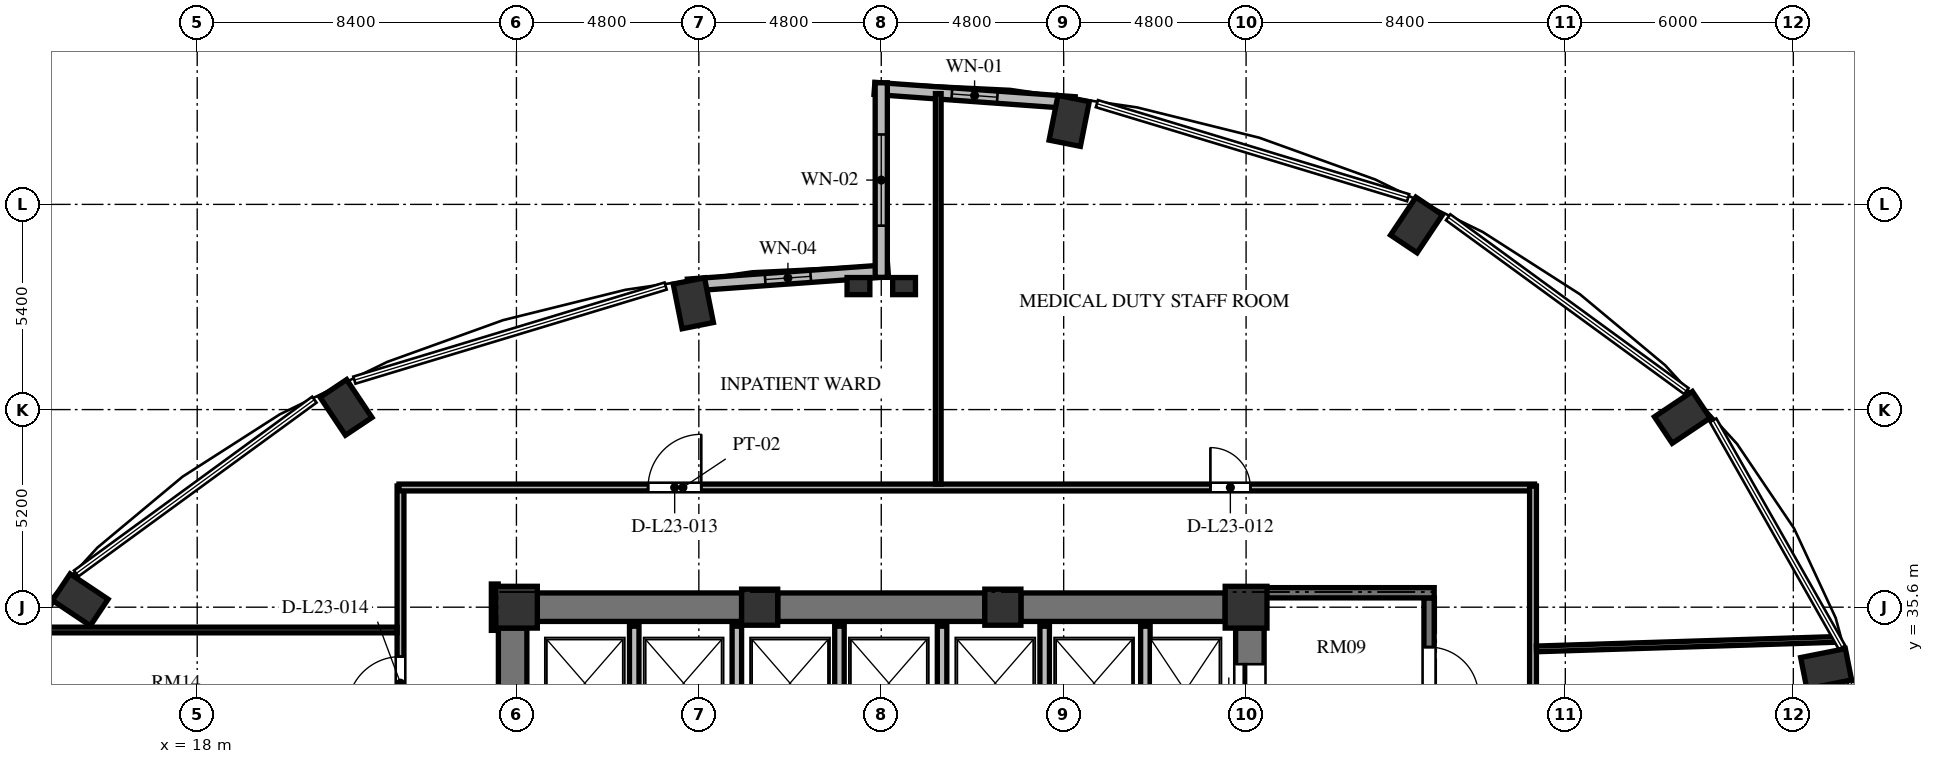
"""IFC4 building model, lengths in metres.
Left out: names, types, materials, properties, quantities, classifications, styles, units other than length and angle.
Written with IfcOpenShell. Run it as: python <this file> out.ifc"""

import sys

from ifc_helpers import new_model, si_unit, direction, frame, frame_2d, origin, origin_2d, place, context, subcontext, project, spatial, rectangle, extrude, element, fill, save


model = new_model("IFC4")
c1 = context("Model", 3, precision=1e-05, world=origin(), true_north=direction((0.0, 1.0)))
c2 = subcontext(c1, "Body", "Model", "MODEL_VIEW")
j1 = project(units=[si_unit("LENGTHUNIT", "METRE"), si_unit("PLANEANGLEUNIT", "RADIAN")], contexts=[c1])
p1 = place(None, origin())
s1 = spatial("IfcSite", under=j1, at=p1, CompositionType="ELEMENT")
p2 = place(p1, origin())
s2 = spatial("IfcBuilding", under=s1, at=p2, CompositionType="ELEMENT")
p3 = place(p2, frame((0.0, 0.0, 92.688)))
s3 = spatial("IfcBuildingStorey", under=s2, at=p3, CompositionType="ELEMENT", Elevation=92.688)
for number, where, z_axis, x_axis in (
    (1, (60.863, 33.98, 0.0), (0.0, 0.0, 1.0), (0.981, 0.195, 0.0)),
    (2, (57.078, 40.595, 0.0), (0.0, 0.0, 1.0), (0.831, 0.556, 0.0)),
    (3, (50.084, 45.657, 0.0), (0.0, 0.0, 1.0), (0.556, 0.831, 0.0)),
    (4, (40.946, 48.397, 0.0), (0.0, 0.0, 1.0), (0.195, 0.981, 0.0)),
    (5, (31.054, 43.597, 0.0), (0.0, 0.0, 1.0), (-0.195, 0.981, 0.0)),
    (6, (21.916, 40.857, 0.0), (0.0, 0.0, 1.0), (-0.556, 0.831, 0.0)),
    (7, (14.922, 35.795, 0.0), (0.0, 0.0, 1.0), (-0.831, 0.556, 0.0)),
):
    element("IfcColumn", number, at=place(p3, frame(where, z_axis=z_axis, x_axis=x_axis)), inside=s3, PredefinedType="COLUMN", context=c2, shape_type="SweptSolid", body=[
        extrude(rectangle(XDim=1.2, YDim=0.84, at=origin_2d()), origin(), (0.0, 0.0, 1.0), 3.648),
    ])
p4 = place(p3, frame((45.6, 35.6, 0.0), z_axis=(0.0, 0.0, 1.0), x_axis=(1.0, 0.0, 0.0)))
e8 = element("IfcColumn", 8, at=p4, inside=s3, PredefinedType="COLUMN", context=c2, shape_type="SweptSolid", body=[
    extrude(rectangle(XDim=1.1, YDim=1.1, at=origin_2d()), origin(), (0.0, 0.0, 1.0), 3.648),
])
for number, where, z_axis, x_axis in (
    (9, (39.2, 35.6, 0.0), (0.0, 0.0, 1.0), (1.0, 0.0, 0.0)),
    (10, (32.8, 35.6, 0.0), (0.0, 0.0, 1.0), (1.0, 0.0, 0.0)),
):
    element("IfcColumn", number, at=place(p3, frame(where, z_axis=z_axis, x_axis=x_axis)), inside=s3, PredefinedType="COLUMN", context=c2, shape_type="SweptSolid", body=[
        extrude(rectangle(XDim=0.95, YDim=0.95, at=origin_2d()), origin(), (0.0, 0.0, 1.0), 3.648),
    ])
p5 = place(p3, frame((26.4, 35.6, 0.0), z_axis=(0.0, 0.0, 1.0), x_axis=(1.0, 0.0, 0.0)))
e11 = element("IfcColumn", 11, at=p5, inside=s3, PredefinedType="COLUMN", context=c2, shape_type="SweptSolid", body=[
    extrude(rectangle(XDim=1.1, YDim=1.1, at=origin_2d()), origin(), (0.0, 0.0, 1.0), 3.648),
])
for number, where, z_axis, x_axis in (
    (12, (35.4, 44.05, 0.0), (0.0, 0.0, 1.0), (1.0, 0.0, 0.0)),
    (13, (36.6, 44.05, 0.0), (0.0, 0.0, 1.0), (1.0, 0.0, 0.0)),
):
    element("IfcColumn", number, at=place(p3, frame(where, z_axis=z_axis, x_axis=x_axis)), inside=s3, PredefinedType="PILASTER", context=c2, shape_type="SweptSolid", body=[
        extrude(rectangle(XDim=0.6, YDim=0.45, at=origin_2d()), origin(), (0.0, 0.0, 1.0), 3.648),
    ])
p6 = place(p3, frame((26.3, 20.95, 0.0), z_axis=(0.0, 0.0, 1.0), x_axis=(0.0, 1.0, 0.0)))
e14 = element("IfcWall", 14, at=p6, inside=s3, PredefinedType="SHEAR", context=c2, shape_type="SweptSolid", body=[
    extrude(rectangle(XDim=14.1, YDim=0.75, at=frame_2d((7.05, 0.0))), origin(), (0.0, 0.0, 1.0), 3.648),
])
p7 = place(p6, frame((6.5, 0.0, 0.0)))
e15 = element("IfcOpeningElement", 15, at=p7, cuts=e14, PredefinedType="OPENING", context=c2, shape_type="SweptSolid", body=[
    extrude(rectangle(XDim=1.2, YDim=2.15, at=frame_2d((0.6, 1.075))), frame((0.0, 0.385, 0.0), z_axis=(0.0, -1.0, 0.0), x_axis=(1.0, 0.0, 0.0)), (0.0, 0.0, 1.0), 0.77),
])
p8 = place(p6, frame((9.6, 0.0, 0.0)))
e16 = element("IfcOpeningElement", 16, at=p8, cuts=e14, PredefinedType="OPENING", context=c2, shape_type="SweptSolid", body=[
    extrude(rectangle(XDim=1.3, YDim=2.2, at=frame_2d((0.65, 1.1))), frame((0.0, 0.385, 0.0), z_axis=(0.0, -1.0, 0.0), x_axis=(1.0, 0.0, 0.0)), (0.0, 0.0, 1.0), 0.77),
])
p9 = place(p6, frame((3.26, 0.0, 0.0)))
e17 = element("IfcOpeningElement", 17, at=p9, cuts=e14, PredefinedType="OPENING", context=c2, shape_type="SweptSolid", body=[
    extrude(rectangle(XDim=1.3, YDim=2.2, at=frame_2d((0.65, 1.1))), frame((0.0, 0.385, 0.0), z_axis=(0.0, -1.0, 0.0), x_axis=(1.0, 0.0, 0.0)), (0.0, 0.0, 1.0), 0.77),
])
p10 = place(p3, frame((45.7, 20.95, 0.0), z_axis=(0.0, 0.0, 1.0), x_axis=(0.0, 1.0, 0.0)))
e18 = element("IfcWall", 18, at=p10, inside=s3, PredefinedType="SHEAR", context=c2, shape_type="SweptSolid", body=[
    extrude(rectangle(XDim=14.1, YDim=0.75, at=frame_2d((7.05, 0.0))), origin(), (0.0, 0.0, 1.0), 3.648),
])
p11 = place(p10, frame((11.75, 0.0, 0.0)))
e19 = element("IfcOpeningElement", 19, at=p11, cuts=e18, PredefinedType="OPENING", context=c2, shape_type="SweptSolid", body=[
    extrude(rectangle(XDim=1.4, YDim=2.3, at=frame_2d((0.7, 1.15))), frame((0.0, 0.385, 0.0), z_axis=(0.0, -1.0, 0.0), x_axis=(1.0, 0.0, 0.0)), (0.0, 0.0, 1.0), 0.77),
])
p12 = place(p10, frame((0.95, 0.0, 0.0)))
e20 = element("IfcOpeningElement", 20, at=p12, cuts=e18, PredefinedType="OPENING", context=c2, shape_type="SweptSolid", body=[
    extrude(rectangle(XDim=1.4, YDim=2.3, at=frame_2d((0.7, 1.15))), frame((0.0, 0.385, 0.0), z_axis=(0.0, -1.0, 0.0), x_axis=(1.0, 0.0, 0.0)), (0.0, 0.0, 1.0), 0.77),
])
p13 = place(p3, frame((26.95, 35.6, 0.0), z_axis=(0.0, 0.0, 1.0), x_axis=(1.0, 0.0, 0.0)))
e21 = element("IfcWall", 21, at=p13, inside=s3, PredefinedType="SHEAR", context=c2, shape_type="SweptSolid", body=[
    extrude(rectangle(XDim=5.375, YDim=0.75, at=frame_2d((2.688, 0.0))), origin(), (0.0, 0.0, 1.0), 3.648),
])
p14 = place(p3, frame((33.275, 35.6, 0.0), z_axis=(0.0, 0.0, 1.0), x_axis=(1.0, 0.0, 0.0)))
e22 = element("IfcWall", 22, at=p14, inside=s3, PredefinedType="SHEAR", context=c2, shape_type="SweptSolid", body=[
    extrude(rectangle(XDim=5.45, YDim=0.75, at=frame_2d((2.725, 0.0))), origin(), (0.0, 0.0, 1.0), 3.648),
])
p15 = place(p3, frame((39.675, 35.6, 0.0), z_axis=(0.0, 0.0, 1.0), x_axis=(1.0, 0.0, 0.0)))
e23 = element("IfcWall", 23, at=p15, inside=s3, PredefinedType="SHEAR", context=c2, shape_type="SweptSolid", body=[
    extrude(rectangle(XDim=5.375, YDim=0.75, at=frame_2d((2.688, 0.0))), origin(), (0.0, 0.0, 1.0), 3.648),
])
p16 = place(p3, frame((41.091, 48.875, 0.0), z_axis=(0.0, 0.0, 1.0), x_axis=(-0.997432364291, 0.071614793619, 0.0)))
e24 = element("IfcWall", 24, at=p16, inside=s3, PredefinedType="SOLIDWALL", context=c2, shape_type="SweptSolid", body=[
    extrude(rectangle(XDim=5.284, YDim=0.32, at=frame_2d((2.642, 0.0))), origin(), (0.0, 0.0, 1.0), 3.428),
])
p17 = place(p16, frame((2.042, 0.0, 0.85)))
e25 = element("IfcOpeningElement", 25, at=p17, cuts=e24, PredefinedType="OPENING", context=c2, shape_type="SweptSolid", body=[
    extrude(rectangle(XDim=1.2, YDim=2.2, at=frame_2d((0.6, 1.1))), frame((0.0, 0.17, 0.0), z_axis=(0.0, -1.0, 0.0), x_axis=(1.0, 0.0, 0.0)), (0.0, 0.0, 1.0), 0.34),
])
p18 = place(p3, frame((36.179, 44.453, 0.0), z_axis=(0.0, 0.0, 1.0), x_axis=(-0.997431890304, -0.071621394884, 0.0)))
e26 = element("IfcWall", 26, at=p18, inside=s3, PredefinedType="SOLIDWALL", context=c2, shape_type="SweptSolid", body=[
    extrude(rectangle(XDim=5.284, YDim=0.32, at=frame_2d((2.642, 0.0))), origin(), (0.0, 0.0, 1.0), 3.428),
])
p19 = place(p18, frame((2.042, 0.0, 0.85)))
e27 = element("IfcOpeningElement", 27, at=p19, cuts=e26, PredefinedType="OPENING", context=c2, shape_type="SweptSolid", body=[
    extrude(rectangle(XDim=1.2, YDim=1.8, at=frame_2d((0.6, 0.9))), frame((0.0, 0.17, 0.0), z_axis=(0.0, -1.0, 0.0), x_axis=(1.0, 0.0, 0.0)), (0.0, 0.0, 1.0), 0.34),
])
p20 = place(p3, frame((36.0, 49.4, 0.0), z_axis=(0.0, 0.0, 1.0), x_axis=(0.0, -1.0, 0.0)))
e28 = element("IfcWall", 28, at=p20, inside=s3, PredefinedType="SOLIDWALL", context=c2, shape_type="SweptSolid", body=[
    extrude(rectangle(XDim=5.12, YDim=0.32, at=frame_2d((2.56, 0.0))), origin(), (0.0, 0.0, 1.0), 3.428),
])
p21 = place(p20, frame((1.36, 0.0, 0.84)))
e29 = element("IfcOpeningElement", 29, at=p21, cuts=e28, PredefinedType="OPENING", context=c2, shape_type="SweptSolid", body=[
    extrude(rectangle(XDim=2.4, YDim=2.04, at=frame_2d((1.2, 1.02))), frame((0.0, 0.17, 0.0), z_axis=(0.0, -1.0, 0.0), x_axis=(1.0, 0.0, 0.0)), (0.0, 0.0, 1.0), 0.34),
])
p22 = place(p3, frame((42.95, 31.92, 0.0), z_axis=(0.0, 0.0, 1.0), x_axis=(0.0, 1.0, 0.0)))
e30 = element("IfcWall", 30, at=p22, inside=s3, PredefinedType="SOLIDWALL", context=c2, shape_type="SweptSolid", body=[
    extrude(rectangle(XDim=3.18, YDim=0.25, at=frame_2d((1.59, 0.0))), origin(), (0.0, 0.0, 1.0), 3.428),
])
for number, where, z_axis, x_axis in (
    (31, (29.5, 32.42, 0.0), (0.0, 0.0, 1.0), (0.0, 1.0, 0.0)),
    (32, (32.2, 32.42, 0.0), (0.0, 0.0, 1.0), (0.0, 1.0, 0.0)),
    (33, (34.9, 32.42, 0.0), (0.0, 0.0, 1.0), (0.0, 1.0, 0.0)),
    (34, (37.6, 32.42, 0.0), (0.0, 0.0, 1.0), (0.0, 1.0, 0.0)),
    (35, (40.3, 32.42, 0.0), (0.0, 0.0, 1.0), (0.0, 1.0, 0.0)),
):
    element("IfcWall", number, at=place(p3, frame(where, z_axis=z_axis, x_axis=x_axis)), inside=s3, PredefinedType="SOLIDWALL", context=c2, shape_type="SweptSolid", body=[
        extrude(rectangle(XDim=2.68, YDim=0.25, at=frame_2d((1.34, 0.0))), origin(), (0.0, 0.0, 1.0), 3.428),
    ])
p23 = place(p3, frame((50.415, 35.845, 0.0), z_axis=(0.0, 0.0, 1.0), x_axis=(0.0, -1.0, 0.0)))
e36 = element("IfcWall", 36, at=p23, inside=s3, PredefinedType="SHEAR", context=c2, shape_type="SweptSolid", body=[
    extrude(rectangle(XDim=15.825, YDim=0.27, at=frame_2d((7.913, 0.0))), origin(), (0.0, 0.0, 1.0), 3.648),
])
p24 = place(p23, frame((4.445, 0.0, 0.0)))
e37 = element("IfcOpeningElement", 37, at=p24, cuts=e36, PredefinedType="OPENING", context=c2, shape_type="SweptSolid", body=[
    extrude(rectangle(XDim=1.2, YDim=2.15, at=frame_2d((0.6, 1.075))), frame((0.0, 0.145, 0.0), z_axis=(0.0, -1.0, 0.0), x_axis=(1.0, 0.0, 0.0)), (0.0, 0.0, 1.0), 0.29),
])
p25 = place(p23, frame((1.295, 0.0, 0.0)))
e38 = element("IfcOpeningElement", 38, at=p25, cuts=e36, PredefinedType="OPENING", context=c2, shape_type="SweptSolid", body=[
    extrude(rectangle(XDim=1.3, YDim=2.2, at=frame_2d((0.65, 1.1))), frame((0.0, 0.145, 0.0), z_axis=(0.0, -1.0, 0.0), x_axis=(1.0, 0.0, 0.0)), (0.0, 0.0, 1.0), 0.29),
])
p26 = place(p23, frame((13.095, 0.0, 0.0)))
e39 = element("IfcOpeningElement", 39, at=p26, cuts=e36, PredefinedType="OPENING", context=c2, shape_type="SweptSolid", body=[
    extrude(rectangle(XDim=1.3, YDim=2.2, at=frame_2d((0.65, 1.1))), frame((0.0, 0.145, 0.0), z_axis=(0.0, -1.0, 0.0), x_axis=(1.0, 0.0, 0.0)), (0.0, 0.0, 1.0), 0.29),
])
p27 = place(p3, frame((46.075, 35.98, 0.0), z_axis=(0.0, 0.0, 1.0), x_axis=(1.0, 0.0, 0.0)))
e40 = element("IfcWall", 40, at=p27, inside=s3, PredefinedType="SHEAR", context=c2, shape_type="SweptSolid", body=[
    extrude(rectangle(XDim=4.475, YDim=0.27, at=frame_2d((2.238, 0.0))), origin(), (0.0, 0.0, 1.0), 3.648),
])
p28 = place(p3, frame((23.35, 29.36, 0.0), z_axis=(0.0, 0.0, 1.0), x_axis=(0.0, 1.0, 0.0)))
e41 = element("IfcWall", 41, at=p28, inside=s3, PredefinedType="PARTITIONING", context=c2, shape_type="SweptSolid", body=[
    extrude(rectangle(XDim=9.43, YDim=0.18, at=frame_2d((4.715, 0.0))), origin(), (0.0, 0.0, 1.0), 3.428),
])
p29 = place(p28, frame((3.54, 0.0, 0.0)))
e42 = element("IfcOpeningElement", 42, at=p29, cuts=e41, PredefinedType="OPENING", context=c2, shape_type="SweptSolid", body=[
    extrude(rectangle(XDim=1.4, YDim=2.2, at=frame_2d((0.7, 1.1))), frame((0.0, 0.1, 0.0), z_axis=(0.0, -1.0, 0.0), x_axis=(1.0, 0.0, 0.0)), (0.0, 0.0, 1.0), 0.2),
])
p30 = place(p3, frame((23.31, 38.75, 0.0), z_axis=(0.0, 0.0, 1.0), x_axis=(1.0, 0.0, 0.0)))
e43 = element("IfcWall", 43, at=p30, inside=s3, PredefinedType="PARTITIONING", context=c2, shape_type="SweptSolid", body=[
    extrude(rectangle(XDim=29.88, YDim=0.18, at=frame_2d((14.94, 0.0))), origin(), (0.0, 0.0, 1.0), 3.053),
])
p31 = place(p30, frame((21.351, 0.0, 0.0)))
e44 = element("IfcOpeningElement", 44, at=p31, cuts=e43, PredefinedType="OPENING", context=c2, shape_type="SweptSolid", body=[
    extrude(rectangle(XDim=1.05, YDim=2.15, at=frame_2d((0.525, 1.075))), frame((0.0, 0.1, 0.0), z_axis=(0.0, -1.0, 0.0), x_axis=(1.0, 0.0, 0.0)), (0.0, 0.0, 1.0), 0.2),
])
p32 = place(p30, frame((6.554, 0.0, 0.0)))
e45 = element("IfcOpeningElement", 45, at=p32, cuts=e43, PredefinedType="OPENING", context=c2, shape_type="SweptSolid", body=[
    extrude(rectangle(XDim=1.4, YDim=2.2, at=frame_2d((0.7, 1.1))), frame((0.0, 0.1, 0.0), z_axis=(0.0, -1.0, 0.0), x_axis=(1.0, 0.0, 0.0)), (0.0, 0.0, 1.0), 0.2),
])
p33 = place(p3, frame((53.15, 38.79, 0.0), z_axis=(0.0, 0.0, 1.0), x_axis=(0.0, -1.0, 0.0)))
e46 = element("IfcWall", 46, at=p33, inside=s3, PredefinedType="PARTITIONING", context=c2, shape_type="SweptSolid", body=[
    extrude(rectangle(XDim=9.43, YDim=0.18, at=frame_2d((4.715, 0.0))), origin(), (0.0, 0.0, 1.0), 3.428),
])
p34 = place(p3, frame((25.83, 36.21, 0.0), z_axis=(0.0, 0.0, 1.0), x_axis=(0.0, -1.0, 0.0)))
e47 = element("IfcWall", 47, at=p34, inside=s3, PredefinedType="PARTITIONING", context=c2, shape_type="SweptSolid", body=[
    extrude(rectangle(XDim=1.22, YDim=0.18, at=frame_2d((0.61, 0.0))), origin(), (0.0, 0.0, 1.0), 3.428),
])
p35 = place(p3, frame((13.71, 35.0, 0.0), z_axis=(0.0, 0.0, 1.0), x_axis=(1.0, 0.0, 0.0)))
e48 = element("IfcWall", 48, at=p35, inside=s3, PredefinedType="PARTITIONING", context=c2, shape_type="SweptSolid", body=[
    extrude(rectangle(XDim=9.55, YDim=0.15, at=frame_2d((4.775, 0.0))), origin(), (0.0, 0.0, 1.0), 3.428),
])
p36 = place(p3, frame((53.24, 34.502, 0.0), z_axis=(0.0, 0.0, 1.0), x_axis=(0.999499445349, 0.031636351679, 0.0)))
e49 = element("IfcWall", 49, at=p36, inside=s3, PredefinedType="PARTITIONING", context=c2, shape_type="SweptSolid", body=[
    extrude(rectangle(XDim=7.933, YDim=0.15, at=frame_2d((3.967, 0.0))), origin(), (0.0, 0.0, 1.0), 2.813),
])
p37 = place(p3, frame((37.5, 38.84, 0.0), z_axis=(0.0, 0.0, 1.0), x_axis=(0.0, 1.0, 0.0)))
e50 = element("IfcWall", 50, at=p37, inside=s3, PredefinedType="PARTITIONING", context=c2, shape_type="SweptSolid", body=[
    extrude(rectangle(XDim=10.274, YDim=0.15, at=frame_2d((5.137, 0.0))), origin(), (0.0, 0.0, 1.0), 3.428),
])
p38 = place(p17, origin())
e51 = element("IfcWindow", 51, at=p38, inside=s3, PartitioningType="SINGLE_PANEL", PredefinedType="WINDOW", context=c2, shape_type="SweptSolid", body=[
    extrude(rectangle(XDim=1.2, YDim=2.2, at=frame_2d((0.6, 1.1))), frame((0.0, 0.03, 0.0), z_axis=(0.0, -1.0, 0.0), x_axis=(1.0, 0.0, 0.0)), (0.0, 0.0, 1.0), 0.06),
])
fill(e25, e51)
p39 = place(p19, origin())
e52 = element("IfcWindow", 52, at=p39, inside=s3, PartitioningType="SINGLE_PANEL", PredefinedType="WINDOW", context=c2, shape_type="SweptSolid", body=[
    extrude(rectangle(XDim=1.2, YDim=1.8, at=frame_2d((0.6, 0.9))), frame((0.0, 0.03, 0.0), z_axis=(0.0, -1.0, 0.0), x_axis=(1.0, 0.0, 0.0)), (0.0, 0.0, 1.0), 0.06),
])
fill(e27, e52)
p40 = place(p21, origin())
e53 = element("IfcWindow", 53, at=p40, inside=s3, PartitioningType="SINGLE_PANEL", PredefinedType="WINDOW", context=c2, shape_type="SweptSolid", body=[
    extrude(rectangle(XDim=2.4, YDim=2.04, at=frame_2d((1.2, 1.02))), frame((0.0, 0.03, 0.0), z_axis=(0.0, -1.0, 0.0), x_axis=(1.0, 0.0, 0.0)), (0.0, 0.0, 1.0), 0.06),
])
fill(e29, e53)
p41 = place(p11, origin())
e54 = element("IfcDoor", 54, at=p41, inside=s3, OperationType="SLIDING_TO_LEFT", PredefinedType="DOOR", context=c2, shape_type="SweptSolid", body=[
    extrude(rectangle(XDim=1.4, YDim=2.3, at=frame_2d((0.7, 1.15))), frame((0.0, 0.025, 0.0), z_axis=(0.0, -1.0, 0.0), x_axis=(1.0, 0.0, 0.0)), (0.0, 0.0, 1.0), 0.05),
])
fill(e19, e54)
p42 = place(p25, origin())
e55 = element("IfcDoor", 55, at=p42, inside=s3, OperationType="SINGLE_SWING_RIGHT", PredefinedType="DOOR", context=c2, shape_type="SweptSolid", body=[
    extrude(rectangle(XDim=1.3, YDim=2.2, at=frame_2d((0.65, 1.1))), frame((0.0, 0.025, 0.0), z_axis=(0.0, -1.0, 0.0), x_axis=(1.0, 0.0, 0.0)), (0.0, 0.0, 1.0), 0.05),
])
fill(e38, e55)
p43 = place(p31, origin())
e56 = element("IfcDoor", 56, at=p43, inside=s3, OperationType="SINGLE_SWING_LEFT", PredefinedType="DOOR", context=c2, shape_type="SweptSolid", body=[
    extrude(rectangle(XDim=1.05, YDim=2.15, at=frame_2d((0.525, 1.075))), frame((0.0, 0.025, 0.0), z_axis=(0.0, -1.0, 0.0), x_axis=(1.0, 0.0, 0.0)), (0.0, 0.0, 1.0), 0.05),
])
fill(e44, e56)
p44 = place(p32, origin())
e57 = element("IfcDoor", 57, at=p44, inside=s3, OperationType="SINGLE_SWING_RIGHT", PredefinedType="DOOR", context=c2, shape_type="SweptSolid", body=[
    extrude(rectangle(XDim=1.4, YDim=2.2, at=frame_2d((0.7, 1.1))), frame((0.0, 0.025, 0.0), z_axis=(0.0, -1.0, 0.0), x_axis=(1.0, 0.0, 0.0)), (0.0, 0.0, 1.0), 0.05),
])
fill(e45, e57)
p45 = place(p29, origin())
e58 = element("IfcDoor", 58, at=p45, inside=s3, OperationType="SINGLE_SWING_LEFT", PredefinedType="DOOR", context=c2, shape_type="SweptSolid", body=[
    extrude(rectangle(XDim=1.4, YDim=2.2, at=frame_2d((0.7, 1.1))), frame((0.0, 0.025, 0.0), z_axis=(0.0, -1.0, 0.0), x_axis=(1.0, 0.0, 0.0)), (0.0, 0.0, 1.0), 0.05),
])
fill(e42, e58)
save(model, sys.argv[1])
